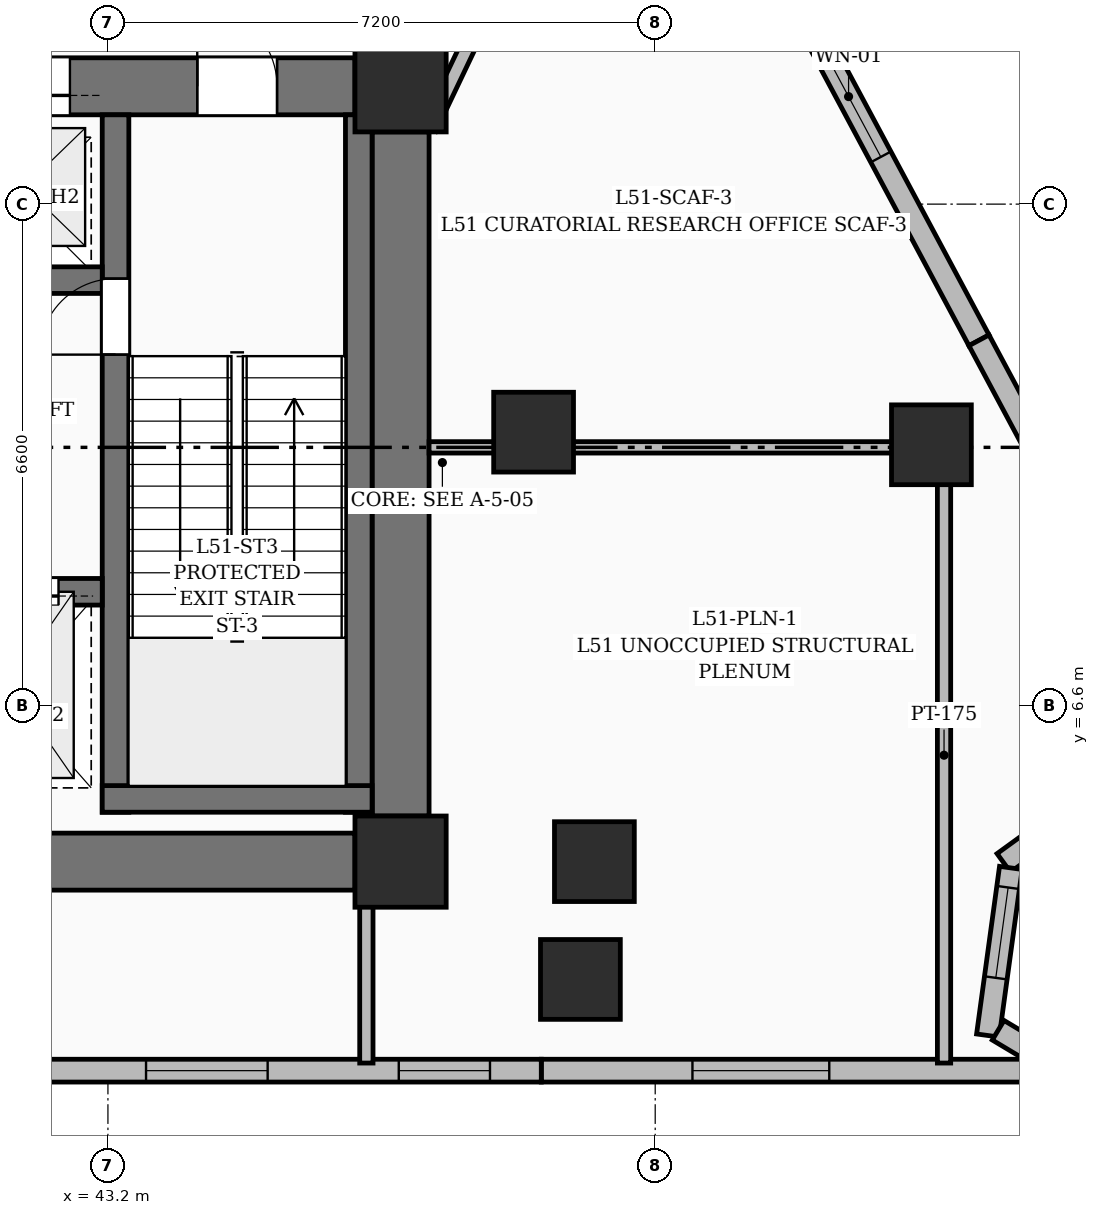
"""IFC4 building model, lengths in metres.
Left out: names, types, materials, properties, quantities, classifications, styles, units other than length and angle.
Written with IfcOpenShell. Run it as: python <this file> out.ifc"""

import sys

from ifc_helpers import new_model, si_unit, direction, frame, frame_2d, origin, origin_2d, place, context, subcontext, project, spatial, rectangle, extrude, element, fill, save


model = new_model("IFC4")
c1 = context("Model", 3, precision=1e-05, world=origin(), true_north=direction((0.0, 1.0)))
c2 = subcontext(c1, "Body", "Model", "MODEL_VIEW")
j1 = project(units=[si_unit("LENGTHUNIT", "METRE"), si_unit("PLANEANGLEUNIT", "RADIAN")], contexts=[c1])
p1 = place(None, origin())
s1 = spatial("IfcSite", under=j1, at=p1, CompositionType="ELEMENT")
p2 = place(p1, origin())
s2 = spatial("IfcBuilding", under=s1, at=p2, CompositionType="ELEMENT")
p3 = place(p2, frame((0.0, 0.0, 196.8)))
s3 = spatial("IfcBuildingStorey", under=s2, at=p3, CompositionType="ELEMENT", Elevation=196.8)
for number, where, z_axis, x_axis in (
    (1, (47.05, 4.55, 0.0), (0.0, 0.0, 1.0), (1.0, 0.0, 0.0)),
    (2, (47.05, 14.75, 0.0), (0.0, 0.0, 1.0), (1.0, 0.0, 0.0)),
):
    element("IfcColumn", number, at=place(p3, frame(where, z_axis=z_axis, x_axis=x_axis)), inside=s3, PredefinedType="COLUMN", context=c2, shape_type="SweptSolid", body=[
        extrude(rectangle(XDim=1.2, YDim=1.2, at=origin_2d()), origin(), (0.0, 0.0, 1.0), 4.8),
    ])
for number, where, z_axis, x_axis in (
    (3, (49.6, 4.55, 0.0), (0.0, 0.0, 1.0), (1.0, 0.0, 0.0)),
    (4, (48.8, 10.2, 0.0), (0.0, 0.0, 1.0), (1.0, 0.0, 0.0)),
):
    element("IfcColumn", number, at=place(p3, frame(where, z_axis=z_axis, x_axis=x_axis)), inside=s3, PredefinedType="COLUMN", context=c2, shape_type="SweptSolid", body=[
        extrude(rectangle(XDim=1.05, YDim=1.05, at=origin_2d()), origin(), (0.0, 0.0, 1.0), 4.8),
    ])
p4 = place(p3, frame((35.75, 4.55, 0.0), z_axis=(0.0, 0.0, 1.0), x_axis=(1.0, 0.0, 0.0)))
e5 = element("IfcWall", 5, at=p4, inside=s3, PredefinedType="SHEAR", context=c2, shape_type="SweptSolid", body=[
    extrude(rectangle(XDim=10.7, YDim=0.75, at=frame_2d((5.35, 0.0))), origin(), (0.0, 0.0, 1.0), 4.8),
])
p5 = place(p3, frame((35.75, 14.75, 0.0), z_axis=(0.0, 0.0, 1.0), x_axis=(1.0, 0.0, 0.0)))
e6 = element("IfcWall", 6, at=p5, inside=s3, PredefinedType="SHEAR", context=c2, shape_type="SweptSolid", body=[
    extrude(rectangle(XDim=10.7, YDim=0.75, at=frame_2d((5.35, 0.0))), origin(), (0.0, 0.0, 1.0), 4.8),
])
p6 = place(p5, frame((1.025, 0.0, 0.0)))
e7 = element("IfcOpeningElement", 7, at=p6, cuts=e6, PredefinedType="OPENING", context=c2, shape_type="SweptSolid", body=[
    extrude(rectangle(XDim=1.05, YDim=2.15, at=frame_2d((0.525, 1.075))), frame((0.0, 0.385, 0.0), z_axis=(0.0, -1.0, 0.0), x_axis=(1.0, 0.0, 0.0)), (0.0, 0.0, 1.0), 0.77),
])
p7 = place(p5, frame((8.625, 0.0, 0.0)))
e8 = element("IfcOpeningElement", 8, at=p7, cuts=e6, PredefinedType="OPENING", context=c2, shape_type="SweptSolid", body=[
    extrude(rectangle(XDim=1.05, YDim=2.15, at=frame_2d((0.525, 1.075))), frame((0.0, 0.385, 0.0), z_axis=(0.0, -1.0, 0.0), x_axis=(1.0, 0.0, 0.0)), (0.0, 0.0, 1.0), 0.77),
])
p8 = place(p5, frame((3.75, 0.0, 0.0)))
e9 = element("IfcOpeningElement", 9, at=p8, cuts=e6, PredefinedType="OPENING", context=c2, shape_type="SweptSolid", body=[
    extrude(rectangle(XDim=1.2, YDim=2.2, at=frame_2d((0.6, 1.1))), frame((0.0, 0.385, 0.0), z_axis=(0.0, -1.0, 0.0), x_axis=(1.0, 0.0, 0.0)), (0.0, 0.0, 1.0), 0.77),
])
p9 = place(p5, frame((5.75, 0.0, 0.0)))
e10 = element("IfcOpeningElement", 10, at=p9, cuts=e6, PredefinedType="OPENING", context=c2, shape_type="SweptSolid", body=[
    extrude(rectangle(XDim=1.2, YDim=2.2, at=frame_2d((0.6, 1.1))), frame((0.0, 0.385, 0.0), z_axis=(0.0, -1.0, 0.0), x_axis=(1.0, 0.0, 0.0)), (0.0, 0.0, 1.0), 0.77),
])
p10 = place(p3, frame((47.05, 5.15, 0.0), z_axis=(0.0, 0.0, 1.0), x_axis=(0.0, 1.0, 0.0)))
e11 = element("IfcWall", 11, at=p10, inside=s3, PredefinedType="SHEAR", context=c2, shape_type="SweptSolid", body=[
    extrude(rectangle(XDim=9.0, YDim=0.75, at=frame_2d((4.5, 0.0))), origin(), (0.0, 0.0, 1.0), 4.8),
])
p11 = place(p3, frame((43.3, 5.2, 0.0), z_axis=(0.0, 0.0, 1.0), x_axis=(0.0, 1.0, 0.0)))
e12 = element("IfcWall", 12, at=p11, inside=s3, PredefinedType="SOLIDWALL", context=c2, shape_type="SweptSolid", body=[
    extrude(rectangle(XDim=9.175, YDim=0.35, at=frame_2d((4.587, 0.0))), origin(), (0.0, 0.0, 1.0), 4.8),
])
p12 = place(p11, frame((6.02, 0.0, 0.0)))
e13 = element("IfcOpeningElement", 13, at=p12, cuts=e12, PredefinedType="OPENING", context=c2, shape_type="SweptSolid", body=[
    extrude(rectangle(XDim=1.0, YDim=2.15, at=frame_2d((0.5, 1.075))), frame((0.0, 0.185, 0.0), z_axis=(0.0, -1.0, 0.0), x_axis=(1.0, 0.0, 0.0)), (0.0, 0.0, 1.0), 0.37),
])
p13 = place(p3, frame((46.5, 5.2, 0.0), z_axis=(0.0, 0.0, 1.0), x_axis=(0.0, 1.0, 0.0)))
e14 = element("IfcWall", 14, at=p13, inside=s3, PredefinedType="SOLIDWALL", context=c2, shape_type="SweptSolid", body=[
    extrude(rectangle(XDim=9.175, YDim=0.35, at=frame_2d((4.587, 0.0))), origin(), (0.0, 0.0, 1.0), 4.8),
])
p14 = place(p3, frame((43.125, 5.375, 0.0), z_axis=(0.0, 0.0, 1.0), x_axis=(1.0, 0.0, 0.0)))
e15 = element("IfcWall", 15, at=p14, inside=s3, PredefinedType="SOLIDWALL", context=c2, shape_type="SweptSolid", body=[
    extrude(rectangle(XDim=3.55, YDim=0.35, at=frame_2d((1.775, 0.0))), origin(), (0.0, 0.0, 1.0), 4.8),
])
p15 = place(p3, frame((40.55, 8.1, 0.0), z_axis=(0.0, 0.0, 1.0), x_axis=(1.0, 0.0, 0.0)))
e16 = element("IfcWall", 16, at=p15, inside=s3, PredefinedType="SOLIDWALL", context=c2, shape_type="SweptSolid", body=[
    extrude(rectangle(XDim=2.575, YDim=0.35, at=frame_2d((1.288, 0.0))), origin(), (0.0, 0.0, 1.0), 4.8),
])
p16 = place(p15, frame((0.7, 0.0, 0.0)))
e17 = element("IfcOpeningElement", 17, at=p16, cuts=e16, PredefinedType="OPENING", context=c2, shape_type="SweptSolid", body=[
    extrude(rectangle(XDim=1.3, YDim=2.25, at=frame_2d((0.65, 1.125))), frame((0.0, 0.185, 0.0), z_axis=(0.0, -1.0, 0.0), x_axis=(1.0, 0.0, 0.0)), (0.0, 0.0, 1.0), 0.37),
])
p17 = place(p3, frame((39.075, 12.2, 0.0), z_axis=(0.0, 0.0, 1.0), x_axis=(1.0, 0.0, 0.0)))
e18 = element("IfcWall", 18, at=p17, inside=s3, PredefinedType="SOLIDWALL", context=c2, shape_type="SweptSolid", body=[
    extrude(rectangle(XDim=4.05, YDim=0.35, at=frame_2d((2.025, 0.0))), origin(), (0.0, 0.0, 1.0), 4.8),
])
for number, where, z_axis, x_axis in (
    (19, (49.416, 3.0, 0.0), (0.0, 0.0, 1.0), (1.0, 0.0, 0.0)),
    (20, (54.034, 10.034, 0.0), (0.0, 0.0, 1.0), (1.0, 0.0, 0.0)),
):
    element("IfcColumn", number, at=place(p3, frame(where, z_axis=z_axis, x_axis=x_axis)), inside=s3, PredefinedType="COLUMN", context=c2, shape_type="SweptSolid", body=[
        extrude(rectangle(XDim=1.05, YDim=1.05, at=origin_2d()), origin(), (0.0, 0.0, 1.0), 4.8),
    ])
p18 = place(p3, frame((51.47, 17.37, 0.0), z_axis=(0.0, 0.0, 1.0), x_axis=(0.471740390208, -0.881737491687, 0.0)))
e21 = element("IfcWall", 21, at=p18, inside=s3, PredefinedType="SOLIDWALL", context=c2, shape_type="SweptSolid", body=[
    extrude(rectangle(XDim=6.761, YDim=0.3, at=frame_2d((3.381, 0.0))), origin(), (0.0, 0.0, 1.0), 4.5),
])
p19 = place(p18, frame((2.225, 0.0, 0.6)))
e22 = element("IfcOpeningElement", 22, at=p19, cuts=e21, PredefinedType="OPENING", context=c2, shape_type="SweptSolid", body=[
    extrude(rectangle(XDim=1.8, YDim=2.1, at=frame_2d((0.9, 1.05))), frame((0.0, 0.16, 0.0), z_axis=(0.0, -1.0, 0.0), x_axis=(1.0, 0.0, 0.0)), (0.0, 0.0, 1.0), 0.32),
])
p20 = place(p3, frame((54.659, 11.408, 0.0), z_axis=(0.0, 0.0, 1.0), x_axis=(0.471760157183, -0.881726915827, 0.0)))
e23 = element("IfcWall", 23, at=p20, inside=s3, PredefinedType="SOLIDWALL", context=c2, shape_type="SweptSolid", body=[
    extrude(rectangle(XDim=7.037, YDim=0.3, at=frame_2d((3.518, 0.0))), origin(), (0.0, 0.0, 1.0), 4.5),
])
p21 = place(p20, frame((2.225, 0.0, 0.55)))
e24 = element("IfcOpeningElement", 24, at=p21, cuts=e23, PredefinedType="OPENING", context=c2, shape_type="SweptSolid", body=[
    extrude(rectangle(XDim=1.6, YDim=2.2, at=frame_2d((0.8, 1.1))), frame((0.0, 0.16, 0.0), z_axis=(0.0, -1.0, 0.0), x_axis=(1.0, 0.0, 0.0)), (0.0, 0.0, 1.0), 0.32),
])
p22 = place(p3, frame((56.8, 5.849, 0.0), z_axis=(0.0, 0.0, 1.0), x_axis=(-0.809635036496, -0.586933648446, 0.0)))
e25 = element("IfcWall", 25, at=p22, inside=s3, PredefinedType="SOLIDWALL", context=c2, shape_type="SweptSolid", body=[
    extrude(rectangle(XDim=2.241, YDim=0.3, at=frame_2d((1.12, 0.0))), origin(), (0.0, 0.0, 1.0), 4.5),
])
p23 = place(p22, frame((0.275, 0.0, 0.8)))
e26 = element("IfcOpeningElement", 26, at=p23, cuts=e25, PredefinedType="OPENING", context=c2, shape_type="SweptSolid", body=[
    extrude(rectangle(XDim=1.2, YDim=1.8, at=frame_2d((0.6, 0.9))), frame((0.0, 0.16, 0.0), z_axis=(0.0, -1.0, 0.0), x_axis=(1.0, 0.0, 0.0)), (0.0, 0.0, 1.0), 0.32),
])
p24 = place(p3, frame((55.079, 4.467, 0.0), z_axis=(0.0, 0.0, 1.0), x_axis=(-0.135475439613, -0.99078070493, 0.0)))
e27 = element("IfcWall", 27, at=p24, inside=s3, PredefinedType="SOLIDWALL", context=c2, shape_type="SweptSolid", body=[
    extrude(rectangle(XDim=2.226, YDim=0.3, at=frame_2d((1.113, 0.0))), origin(), (0.0, 0.0, 1.0), 4.5),
])
p25 = place(p24, frame((0.26, 0.0, 0.8)))
e28 = element("IfcOpeningElement", 28, at=p25, cuts=e27, PredefinedType="OPENING", context=c2, shape_type="SweptSolid", body=[
    extrude(rectangle(XDim=1.2, YDim=1.8, at=frame_2d((0.6, 0.9))), frame((0.0, 0.16, 0.0), z_axis=(0.0, -1.0, 0.0), x_axis=(1.0, 0.0, 0.0)), (0.0, 0.0, 1.0), 0.32),
])
p26 = place(p3, frame((54.912, 2.332, 0.0), z_axis=(0.0, 0.0, 1.0), x_axis=(0.857950827386, -0.513731815043, 0.0)))
e29 = element("IfcWall", 29, at=p26, inside=s3, PredefinedType="SOLIDWALL", context=c2, shape_type="SweptSolid", body=[
    extrude(rectangle(XDim=1.175, YDim=0.3, at=frame_2d((0.588, 0.0))), origin(), (0.0, 0.0, 1.0), 4.5),
])
p27 = place(p3, frame((55.37, 1.8, 0.0), z_axis=(0.0, 0.0, 1.0), x_axis=(-1.0, 0.0, 0.0)))
e30 = element("IfcWall", 30, at=p27, inside=s3, PredefinedType="SOLIDWALL", context=c2, shape_type="SweptSolid", body=[
    extrude(rectangle(XDim=6.469, YDim=0.3, at=frame_2d((3.234, 0.0))), origin(), (0.0, 0.0, 1.0), 4.5),
])
p28 = place(p27, frame((2.68, 0.0, 0.6)))
e31 = element("IfcOpeningElement", 31, at=p28, cuts=e30, PredefinedType="OPENING", context=c2, shape_type="SweptSolid", body=[
    extrude(rectangle(XDim=1.8, YDim=2.1, at=frame_2d((0.9, 1.05))), frame((0.0, 0.16, 0.0), z_axis=(0.0, -1.0, 0.0), x_axis=(1.0, 0.0, 0.0)), (0.0, 0.0, 1.0), 0.32),
])
p29 = place(p3, frame((48.901, 1.8, 0.0), z_axis=(0.0, 0.0, 1.0), x_axis=(-1.0, 0.0, 0.0)))
e32 = element("IfcWall", 32, at=p29, inside=s3, PredefinedType="SOLIDWALL", context=c2, shape_type="SweptSolid", body=[
    extrude(rectangle(XDim=7.039, YDim=0.3, at=frame_2d((3.519, 0.0))), origin(), (0.0, 0.0, 1.0), 4.5),
])
p30 = place(p29, frame((3.6, 0.0, 0.55)))
e33 = element("IfcOpeningElement", 33, at=p30, cuts=e32, PredefinedType="OPENING", context=c2, shape_type="SweptSolid", body=[
    extrude(rectangle(XDim=1.6, YDim=2.2, at=frame_2d((0.8, 1.1))), frame((0.0, 0.16, 0.0), z_axis=(0.0, -1.0, 0.0), x_axis=(1.0, 0.0, 0.0)), (0.0, 0.0, 1.0), 0.32),
])
p31 = place(p29, frame((0.675, 0.0, 0.8)))
e34 = element("IfcOpeningElement", 34, at=p31, cuts=e32, PredefinedType="OPENING", context=c2, shape_type="SweptSolid", body=[
    extrude(rectangle(XDim=1.2, YDim=1.8, at=frame_2d((0.6, 0.9))), frame((0.0, 0.16, 0.0), z_axis=(0.0, -1.0, 0.0), x_axis=(1.0, 0.0, 0.0)), (0.0, 0.0, 1.0), 0.32),
])
p32 = place(p3, frame((46.6, 1.9, 0.0), z_axis=(0.0, 0.0, 1.0), x_axis=(0.0, 1.0, 0.0)))
e35 = element("IfcWall", 35, at=p32, inside=s3, PredefinedType="PARTITIONING", context=c2, shape_type="SweptSolid", body=[
    extrude(rectangle(XDim=2.28, YDim=0.175, at=frame_2d((1.14, 0.0))), origin(), (0.0, 0.0, 1.0), 2.27),
])
p33 = place(p3, frame((47.425, 14.2, 0.0), z_axis=(0.0, 0.0, 1.0), x_axis=(0.429753494136, 0.902946252154, 0.0)))
e36 = element("IfcWall", 36, at=p33, inside=s3, PredefinedType="PARTITIONING", context=c2, shape_type="SweptSolid", body=[
    extrude(rectangle(XDim=3.473, YDim=0.2, at=frame_2d((1.737, 0.0))), origin(), (0.0, 0.0, 1.0), 2.27),
])
p34 = place(p3, frame((54.2, 1.9, 0.0), z_axis=(0.0, 0.0, 1.0), x_axis=(0.0, 1.0, 0.0)))
e37 = element("IfcWall", 37, at=p34, inside=s3, PredefinedType="PARTITIONING", context=c2, shape_type="SweptSolid", body=[
    extrude(rectangle(XDim=8.1, YDim=0.175, at=frame_2d((4.05, 0.0))), origin(), (0.0, 0.0, 1.0), 4.5),
])
p35 = place(p3, frame((54.127, 10.0, 0.0), z_axis=(0.0, 0.0, 1.0), x_axis=(-1.0, 0.0, 0.0)))
e38 = element("IfcWall", 38, at=p35, inside=s3, PredefinedType="PARTITIONING", context=c2, shape_type="SweptSolid", body=[
    extrude(rectangle(XDim=6.702, YDim=0.15, at=frame_2d((3.351, 0.0))), origin(), (0.0, 0.0, 1.0), 2.27),
])
p36 = place(p19, origin())
e39 = element("IfcWindow", 39, at=p36, inside=s3, PartitioningType="SINGLE_PANEL", PredefinedType="WINDOW", context=c2, shape_type="SweptSolid", body=[
    extrude(rectangle(XDim=1.8, YDim=2.1, at=frame_2d((0.9, 1.05))), frame((0.0, 0.03, 0.0), z_axis=(0.0, -1.0, 0.0), x_axis=(1.0, 0.0, 0.0)), (0.0, 0.0, 1.0), 0.06),
])
fill(e22, e39)
p37 = place(p25, origin())
e40 = element("IfcWindow", 40, at=p37, inside=s3, PartitioningType="SINGLE_PANEL", PredefinedType="WINDOW", context=c2, shape_type="SweptSolid", body=[
    extrude(rectangle(XDim=1.2, YDim=1.8, at=frame_2d((0.6, 0.9))), frame((0.0, 0.03, 0.0), z_axis=(0.0, -1.0, 0.0), x_axis=(1.0, 0.0, 0.0)), (0.0, 0.0, 1.0), 0.06),
])
fill(e28, e40)
p38 = place(p28, origin())
e41 = element("IfcWindow", 41, at=p38, inside=s3, PartitioningType="SINGLE_PANEL", PredefinedType="WINDOW", context=c2, shape_type="SweptSolid", body=[
    extrude(rectangle(XDim=1.8, YDim=2.1, at=frame_2d((0.9, 1.05))), frame((0.0, 0.03, 0.0), z_axis=(0.0, -1.0, 0.0), x_axis=(1.0, 0.0, 0.0)), (0.0, 0.0, 1.0), 0.06),
])
fill(e31, e41)
p39 = place(p30, origin())
e42 = element("IfcWindow", 42, at=p39, inside=s3, PartitioningType="SINGLE_PANEL", PredefinedType="WINDOW", context=c2, shape_type="SweptSolid", body=[
    extrude(rectangle(XDim=1.6, YDim=2.2, at=frame_2d((0.8, 1.1))), frame((0.0, 0.03, 0.0), z_axis=(0.0, -1.0, 0.0), x_axis=(1.0, 0.0, 0.0)), (0.0, 0.0, 1.0), 0.06),
])
fill(e33, e42)
p40 = place(p31, origin())
e43 = element("IfcWindow", 43, at=p40, inside=s3, PartitioningType="SINGLE_PANEL", PredefinedType="WINDOW", context=c2, shape_type="SweptSolid", body=[
    extrude(rectangle(XDim=1.2, YDim=1.8, at=frame_2d((0.6, 0.9))), frame((0.0, 0.03, 0.0), z_axis=(0.0, -1.0, 0.0), x_axis=(1.0, 0.0, 0.0)), (0.0, 0.0, 1.0), 0.06),
])
fill(e34, e43)
p41 = place(p7, origin())
e44 = element("IfcDoor", 44, at=p41, inside=s3, OperationType="SINGLE_SWING_LEFT", PredefinedType="DOOR", context=c2, shape_type="SweptSolid", body=[
    extrude(rectangle(XDim=1.05, YDim=2.15, at=frame_2d((0.525, 1.075))), frame((0.0, 0.025, 0.0), z_axis=(0.0, -1.0, 0.0), x_axis=(1.0, 0.0, 0.0)), (0.0, 0.0, 1.0), 0.05),
])
fill(e8, e44)
p42 = place(p12, origin())
e45 = element("IfcDoor", 45, at=p42, inside=s3, OperationType="SINGLE_SWING_LEFT", PredefinedType="DOOR", context=c2, shape_type="SweptSolid", body=[
    extrude(rectangle(XDim=1.0, YDim=2.15, at=frame_2d((0.5, 1.075))), frame((0.0, 0.025, 0.0), z_axis=(0.0, -1.0, 0.0), x_axis=(1.0, 0.0, 0.0)), (0.0, 0.0, 1.0), 0.05),
])
fill(e13, e45)
p43 = place(p16, origin())
e46 = element("IfcDoor", 46, at=p43, inside=s3, OperationType="DOUBLE_DOOR_SLIDING", PredefinedType="DOOR", context=c2, shape_type="SweptSolid", body=[
    extrude(rectangle(XDim=1.3, YDim=2.25, at=frame_2d((0.65, 1.125))), frame((0.0, 0.025, 0.0), z_axis=(0.0, -1.0, 0.0), x_axis=(1.0, 0.0, 0.0)), (0.0, 0.0, 1.0), 0.05),
])
fill(e17, e46)
p44 = place(p9, origin())
e47 = element("IfcDoor", 47, at=p44, inside=s3, OperationType="DOUBLE_DOOR_SLIDING", PredefinedType="DOOR", context=c2, shape_type="SweptSolid", body=[
    extrude(rectangle(XDim=1.2, YDim=2.2, at=frame_2d((0.6, 1.1))), frame((0.0, 0.025, 0.0), z_axis=(0.0, -1.0, 0.0), x_axis=(1.0, 0.0, 0.0)), (0.0, 0.0, 1.0), 0.05),
])
fill(e10, e47)
save(model, sys.argv[1])
